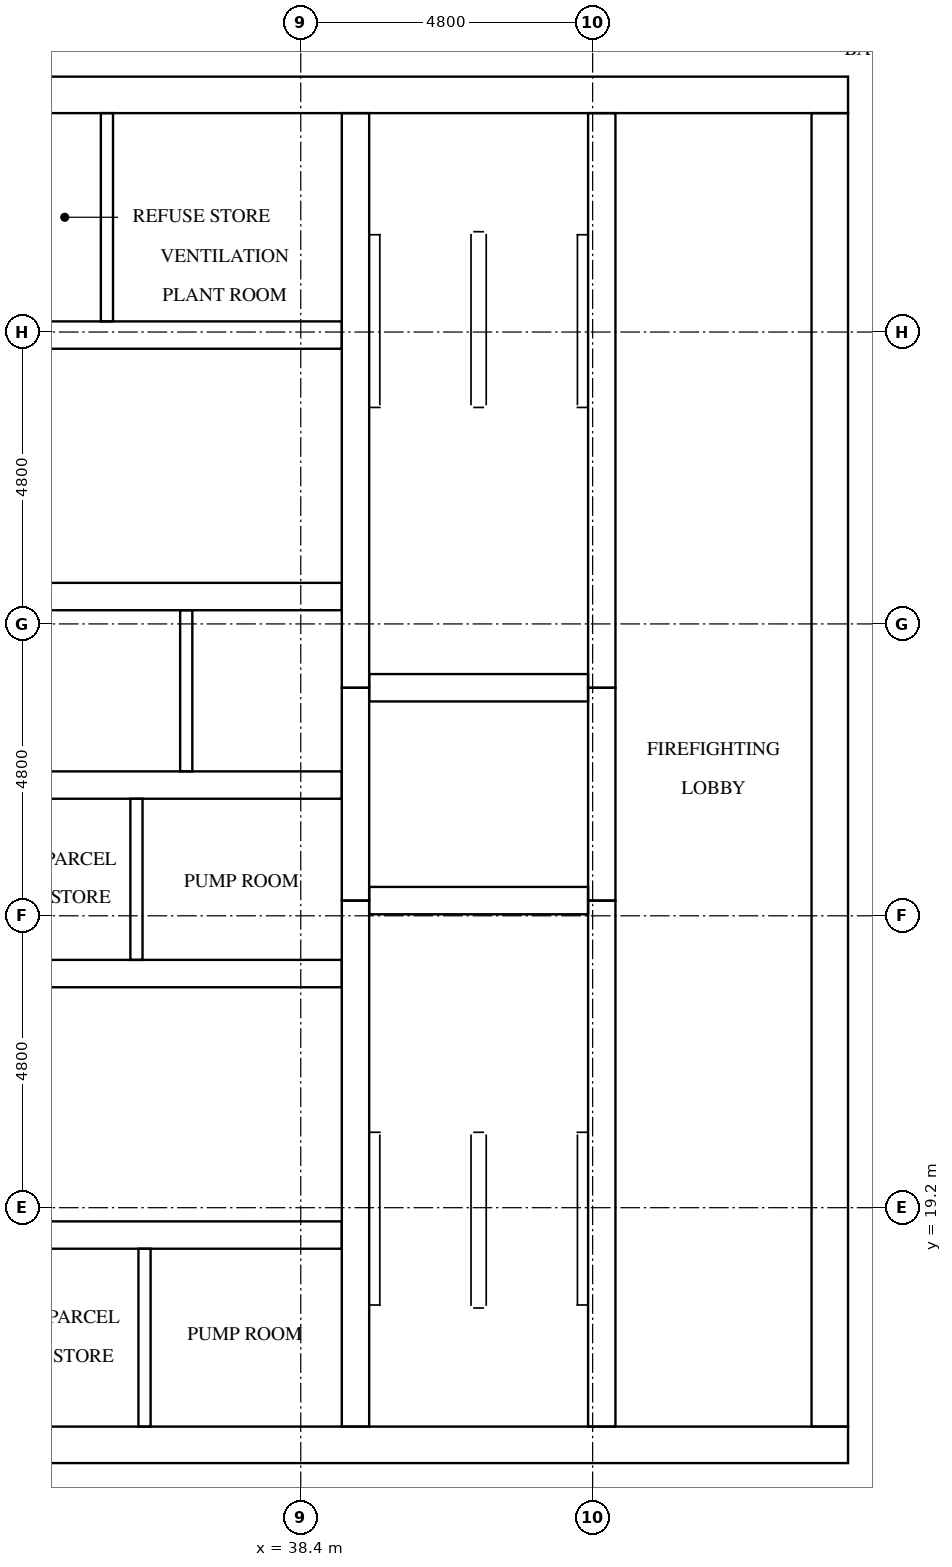
"""IFC4 building model, lengths in metres.
Left out: names, types, materials, properties, quantities, classifications, styles, units other than length and angle.
Written with IfcOpenShell. Run it as: python <this file> out.ifc"""

import sys

from ifc_helpers import new_model, si_unit, direction, frame, frame_2d, origin, place, context, subcontext, project, spatial, rectangle, extrude, element, fill, save


model = new_model("IFC4")
c1 = context("Model", 3, precision=1e-05, world=origin(), true_north=direction((0.0, 1.0)))
c2 = subcontext(c1, "Body", "Model", "MODEL_VIEW")
j1 = project(units=[si_unit("LENGTHUNIT", "METRE"), si_unit("PLANEANGLEUNIT", "RADIAN")], contexts=[c1])
p1 = place(None, origin())
s1 = spatial("IfcSite", under=j1, at=p1, CompositionType="ELEMENT")
p2 = place(p1, origin())
s2 = spatial("IfcBuilding", under=s1, at=p2, CompositionType="ELEMENT")
p3 = place(p2, frame((0.0, 0.0, 245.7)))
s3 = spatial("IfcBuildingStorey", under=s2, at=p3, CompositionType="ELEMENT", Elevation=245.7)
p4 = place(p3, frame((15.0, 15.3, 0.0), z_axis=(0.0, 0.0, 1.0), x_axis=(1.0, 0.0, 0.0)))
e1 = element("IfcWall", 1, at=p4, inside=s3, PredefinedType="SHEAR", context=c2, shape_type="SweptSolid", body=[
    extrude(rectangle(XDim=32.4, YDim=0.6, at=frame_2d((16.2, 0.0))), origin(), (0.0, 0.0, 1.0), 3.2),
])
p5 = place(p4, frame((15.3, 0.0, 0.0)))
e2 = element("IfcOpeningElement", 2, at=p5, cuts=e1, PredefinedType="OPENING", context=c2, shape_type="SweptSolid", body=[
    extrude(rectangle(XDim=1.8, YDim=2.1, at=frame_2d((0.9, 1.05))), frame((0.0, 0.31, 0.0), z_axis=(0.0, -1.0, 0.0), x_axis=(1.0, 0.0, 0.0)), (0.0, 0.0, 1.0), 0.62),
])
p6 = place(p3, frame((15.0, 37.5, 0.0), z_axis=(0.0, 0.0, 1.0), x_axis=(1.0, 0.0, 0.0)))
e3 = element("IfcWall", 3, at=p6, inside=s3, PredefinedType="SHEAR", context=c2, shape_type="SweptSolid", body=[
    extrude(rectangle(XDim=32.4, YDim=0.6, at=frame_2d((16.2, 0.0))), origin(), (0.0, 0.0, 1.0), 3.2),
])
p7 = place(p6, frame((15.3, 0.0, 0.0)))
e4 = element("IfcOpeningElement", 4, at=p7, cuts=e3, PredefinedType="OPENING", context=c2, shape_type="SweptSolid", body=[
    extrude(rectangle(XDim=1.8, YDim=2.1, at=frame_2d((0.9, 1.05))), frame((0.0, 0.31, 0.0), z_axis=(0.0, -1.0, 0.0), x_axis=(1.0, 0.0, 0.0)), (0.0, 0.0, 1.0), 0.62),
])
p8 = place(p6, frame((1.25, 0.0, 0.0)))
e5 = element("IfcOpeningElement", 5, at=p8, cuts=e3, PredefinedType="OPENING", context=c2, shape_type="SweptSolid", body=[
    extrude(rectangle(XDim=1.0, YDim=2.1, at=frame_2d((0.5, 1.05))), frame((0.0, 0.31, 0.0), z_axis=(0.0, -1.0, 0.0), x_axis=(1.0, 0.0, 0.0)), (0.0, 0.0, 1.0), 0.62),
])
p9 = place(p6, frame((4.988, 0.0, 0.0)))
e6 = element("IfcOpeningElement", 6, at=p9, cuts=e3, PredefinedType="OPENING", context=c2, shape_type="SweptSolid", body=[
    extrude(rectangle(XDim=1.0, YDim=2.1, at=frame_2d((0.5, 1.05))), frame((0.0, 0.31, 0.0), z_axis=(0.0, -1.0, 0.0), x_axis=(1.0, 0.0, 0.0)), (0.0, 0.0, 1.0), 0.62),
])
p10 = place(p3, frame((47.1, 15.6, 0.0), z_axis=(0.0, 0.0, 1.0), x_axis=(0.0, 1.0, 0.0)))
e7 = element("IfcWall", 7, at=p10, inside=s3, PredefinedType="SHEAR", context=c2, shape_type="SweptSolid", body=[
    extrude(rectangle(XDim=21.6, YDim=0.6, at=frame_2d((10.8, 0.0))), origin(), (0.0, 0.0, 1.0), 3.2),
])
p11 = place(p10, frame((10.5, 0.0, 0.0)))
e8 = element("IfcOpeningElement", 8, at=p11, cuts=e7, PredefinedType="OPENING", context=c2, shape_type="SweptSolid", body=[
    extrude(rectangle(XDim=1.2, YDim=2.1, at=frame_2d((0.6, 1.05))), frame((0.0, 0.31, 0.0), z_axis=(0.0, -1.0, 0.0), x_axis=(1.0, 0.0, 0.0)), (0.0, 0.0, 1.0), 0.62),
])
p12 = place(p3, frame((39.3, 15.6, 0.0), z_axis=(0.0, 0.0, 1.0), x_axis=(0.0, 1.0, 0.0)))
e9 = element("IfcWall", 9, at=p12, inside=s3, PredefinedType="SHEAR", context=c2, shape_type="SweptSolid", body=[
    extrude(rectangle(XDim=8.65, YDim=0.45, at=frame_2d((4.325, 0.0))), origin(), (0.0, 0.0, 1.0), 3.2),
])
p13 = place(p3, frame((39.3, 24.25, 0.0), z_axis=(0.0, 0.0, 1.0), x_axis=(0.0, 1.0, 0.0)))
e10 = element("IfcWall", 10, at=p13, inside=s3, PredefinedType="SHEAR", context=c2, shape_type="SweptSolid", body=[
    extrude(rectangle(XDim=3.5, YDim=0.45, at=frame_2d((1.75, 0.0))), origin(), (0.0, 0.0, 1.0), 3.2),
])
p14 = place(p3, frame((39.3, 27.75, 0.0), z_axis=(0.0, 0.0, 1.0), x_axis=(0.0, 1.0, 0.0)))
e11 = element("IfcWall", 11, at=p14, inside=s3, PredefinedType="SHEAR", context=c2, shape_type="SweptSolid", body=[
    extrude(rectangle(XDim=9.45, YDim=0.45, at=frame_2d((4.725, 0.0))), origin(), (0.0, 0.0, 1.0), 3.2),
])
p15 = place(p3, frame((43.35, 15.6, 0.0), z_axis=(0.0, 0.0, 1.0), x_axis=(0.0, 1.0, 0.0)))
e12 = element("IfcWall", 12, at=p15, inside=s3, PredefinedType="SHEAR", context=c2, shape_type="SweptSolid", body=[
    extrude(rectangle(XDim=8.65, YDim=0.45, at=frame_2d((4.325, 0.0))), origin(), (0.0, 0.0, 1.0), 3.2),
])
p16 = place(p15, frame((0.6, 0.0, 0.0)))
e13 = element("IfcOpeningElement", 13, at=p16, cuts=e12, PredefinedType="OPENING", context=c2, shape_type="SweptSolid", body=[
    extrude(rectangle(XDim=1.2, YDim=2.1, at=frame_2d((0.6, 1.05))), frame((0.0, 0.235, 0.0), z_axis=(0.0, -1.0, 0.0), x_axis=(1.0, 0.0, 0.0)), (0.0, 0.0, 1.0), 0.47),
])
p17 = place(p3, frame((43.35, 24.25, 0.0), z_axis=(0.0, 0.0, 1.0), x_axis=(0.0, 1.0, 0.0)))
e14 = element("IfcWall", 14, at=p17, inside=s3, PredefinedType="SHEAR", context=c2, shape_type="SweptSolid", body=[
    extrude(rectangle(XDim=3.5, YDim=0.45, at=frame_2d((1.75, 0.0))), origin(), (0.0, 0.0, 1.0), 3.2),
])
p18 = place(p17, frame((1.2, 0.0, 0.0)))
e15 = element("IfcOpeningElement", 15, at=p18, cuts=e14, PredefinedType="OPENING", context=c2, shape_type="SweptSolid", body=[
    extrude(rectangle(XDim=1.1, YDim=2.1, at=frame_2d((0.55, 1.05))), frame((0.0, 0.235, 0.0), z_axis=(0.0, -1.0, 0.0), x_axis=(1.0, 0.0, 0.0)), (0.0, 0.0, 1.0), 0.47),
])
p19 = place(p3, frame((43.35, 27.75, 0.0), z_axis=(0.0, 0.0, 1.0), x_axis=(0.0, 1.0, 0.0)))
e16 = element("IfcWall", 16, at=p19, inside=s3, PredefinedType="SHEAR", context=c2, shape_type="SweptSolid", body=[
    extrude(rectangle(XDim=9.45, YDim=0.45, at=frame_2d((4.725, 0.0))), origin(), (0.0, 0.0, 1.0), 3.2),
])
p20 = place(p19, frame((7.65, 0.0, 0.0)))
e17 = element("IfcOpeningElement", 17, at=p20, cuts=e16, PredefinedType="OPENING", context=c2, shape_type="SweptSolid", body=[
    extrude(rectangle(XDim=1.2, YDim=2.1, at=frame_2d((0.6, 1.05))), frame((0.0, 0.235, 0.0), z_axis=(0.0, -1.0, 0.0), x_axis=(1.0, 0.0, 0.0)), (0.0, 0.0, 1.0), 0.47),
])
for number, where, z_axis, x_axis in (
    (18, (39.525, 24.25, 0.0), (0.0, 0.0, 1.0), (1.0, 0.0, 0.0)),
    (19, (39.525, 27.75, 0.0), (0.0, 0.0, 1.0), (1.0, 0.0, 0.0)),
):
    element("IfcWall", number, at=place(p3, frame(where, z_axis=z_axis, x_axis=x_axis)), inside=s3, PredefinedType="SHEAR", context=c2, shape_type="SweptSolid", body=[
        extrude(rectangle(XDim=3.6, YDim=0.45, at=frame_2d((1.8, 0.0))), origin(), (0.0, 0.0, 1.0), 3.2),
    ])
p21 = place(p3, frame((33.475, 18.75, 0.0), z_axis=(0.0, 0.0, 1.0), x_axis=(1.0, 0.0, 0.0)))
e20 = element("IfcWall", 20, at=p21, inside=s3, PredefinedType="SHEAR", context=c2, shape_type="SweptSolid", body=[
    extrude(rectangle(XDim=5.6, YDim=0.45, at=frame_2d((2.8, 0.0))), origin(), (0.0, 0.0, 1.0), 3.2),
])
p22 = place(p21, frame((0.853, 0.0, 0.0)))
e21 = element("IfcOpeningElement", 21, at=p22, cuts=e20, PredefinedType="OPENING", context=c2, shape_type="SweptSolid", body=[
    extrude(rectangle(XDim=1.0, YDim=2.1, at=frame_2d((0.5, 1.05))), frame((0.0, 0.235, 0.0), z_axis=(0.0, -1.0, 0.0), x_axis=(1.0, 0.0, 0.0)), (0.0, 0.0, 1.0), 0.47),
])
p23 = place(p21, frame((3.528, 0.0, 0.0)))
e22 = element("IfcOpeningElement", 22, at=p23, cuts=e20, PredefinedType="OPENING", context=c2, shape_type="SweptSolid", body=[
    extrude(rectangle(XDim=1.0, YDim=2.1, at=frame_2d((0.5, 1.05))), frame((0.0, 0.235, 0.0), z_axis=(0.0, -1.0, 0.0), x_axis=(1.0, 0.0, 0.0)), (0.0, 0.0, 1.0), 0.47),
])
p24 = place(p3, frame((23.325, 23.05, 0.0), z_axis=(0.0, 0.0, 1.0), x_axis=(1.0, 0.0, 0.0)))
e23 = element("IfcWall", 23, at=p24, inside=s3, PredefinedType="SHEAR", context=c2, shape_type="SweptSolid", body=[
    extrude(rectangle(XDim=15.75, YDim=0.45, at=frame_2d((7.875, 0.0))), origin(), (0.0, 0.0, 1.0), 3.2),
])
p25 = place(p24, frame((0.32, 0.0, 0.0)))
e24 = element("IfcOpeningElement", 24, at=p25, cuts=e23, PredefinedType="OPENING", context=c2, shape_type="SweptSolid", body=[
    extrude(rectangle(XDim=1.0, YDim=2.1, at=frame_2d((0.5, 1.05))), frame((0.0, 0.235, 0.0), z_axis=(0.0, -1.0, 0.0), x_axis=(1.0, 0.0, 0.0)), (0.0, 0.0, 1.0), 0.47),
])
p26 = place(p24, frame((2.978, 0.0, 0.0)))
e25 = element("IfcOpeningElement", 25, at=p26, cuts=e23, PredefinedType="OPENING", context=c2, shape_type="SweptSolid", body=[
    extrude(rectangle(XDim=1.0, YDim=2.1, at=frame_2d((0.5, 1.05))), frame((0.0, 0.235, 0.0), z_axis=(0.0, -1.0, 0.0), x_axis=(1.0, 0.0, 0.0)), (0.0, 0.0, 1.0), 0.47),
])
p27 = place(p24, frame((10.953, 0.0, 0.0)))
e26 = element("IfcOpeningElement", 26, at=p27, cuts=e23, PredefinedType="OPENING", context=c2, shape_type="SweptSolid", body=[
    extrude(rectangle(XDim=1.0, YDim=2.1, at=frame_2d((0.5, 1.05))), frame((0.0, 0.235, 0.0), z_axis=(0.0, -1.0, 0.0), x_axis=(1.0, 0.0, 0.0)), (0.0, 0.0, 1.0), 0.47),
])
p28 = place(p24, frame((13.612, 0.0, 0.0)))
e27 = element("IfcOpeningElement", 27, at=p28, cuts=e23, PredefinedType="OPENING", context=c2, shape_type="SweptSolid", body=[
    extrude(rectangle(XDim=1.0, YDim=2.1, at=frame_2d((0.5, 1.05))), frame((0.0, 0.235, 0.0), z_axis=(0.0, -1.0, 0.0), x_axis=(1.0, 0.0, 0.0)), (0.0, 0.0, 1.0), 0.47),
])
p29 = place(p3, frame((23.325, 26.15, 0.0), z_axis=(0.0, 0.0, 1.0), x_axis=(1.0, 0.0, 0.0)))
e28 = element("IfcWall", 28, at=p29, inside=s3, PredefinedType="SHEAR", context=c2, shape_type="SweptSolid", body=[
    extrude(rectangle(XDim=15.75, YDim=0.45, at=frame_2d((7.875, 0.0))), origin(), (0.0, 0.0, 1.0), 3.2),
])
p30 = place(p3, frame((23.325, 29.25, 0.0), z_axis=(0.0, 0.0, 1.0), x_axis=(1.0, 0.0, 0.0)))
e29 = element("IfcWall", 29, at=p30, inside=s3, PredefinedType="SHEAR", context=c2, shape_type="SweptSolid", body=[
    extrude(rectangle(XDim=15.75, YDim=0.45, at=frame_2d((7.875, 0.0))), origin(), (0.0, 0.0, 1.0), 3.2),
])
p31 = place(p30, frame((0.679, 0.0, 0.0)))
e30 = element("IfcOpeningElement", 30, at=p31, cuts=e29, PredefinedType="OPENING", context=c2, shape_type="SweptSolid", body=[
    extrude(rectangle(XDim=1.1, YDim=2.1, at=frame_2d((0.55, 1.05))), frame((0.0, 0.235, 0.0), z_axis=(0.0, -1.0, 0.0), x_axis=(1.0, 0.0, 0.0)), (0.0, 0.0, 1.0), 0.47),
])
p32 = place(p30, frame((3.337, 0.0, 0.0)))
e31 = element("IfcOpeningElement", 31, at=p32, cuts=e29, PredefinedType="OPENING", context=c2, shape_type="SweptSolid", body=[
    extrude(rectangle(XDim=1.1, YDim=2.1, at=frame_2d((0.55, 1.05))), frame((0.0, 0.235, 0.0), z_axis=(0.0, -1.0, 0.0), x_axis=(1.0, 0.0, 0.0)), (0.0, 0.0, 1.0), 0.47),
])
p33 = place(p30, frame((5.996, 0.0, 0.0)))
e32 = element("IfcOpeningElement", 32, at=p33, cuts=e29, PredefinedType="OPENING", context=c2, shape_type="SweptSolid", body=[
    extrude(rectangle(XDim=1.1, YDim=2.1, at=frame_2d((0.55, 1.05))), frame((0.0, 0.235, 0.0), z_axis=(0.0, -1.0, 0.0), x_axis=(1.0, 0.0, 0.0)), (0.0, 0.0, 1.0), 0.47),
])
p34 = place(p30, frame((8.654, 0.0, 0.0)))
e33 = element("IfcOpeningElement", 33, at=p34, cuts=e29, PredefinedType="OPENING", context=c2, shape_type="SweptSolid", body=[
    extrude(rectangle(XDim=1.1, YDim=2.1, at=frame_2d((0.55, 1.05))), frame((0.0, 0.235, 0.0), z_axis=(0.0, -1.0, 0.0), x_axis=(1.0, 0.0, 0.0)), (0.0, 0.0, 1.0), 0.47),
])
p35 = place(p30, frame((11.312, 0.0, 0.0)))
e34 = element("IfcOpeningElement", 34, at=p35, cuts=e29, PredefinedType="OPENING", context=c2, shape_type="SweptSolid", body=[
    extrude(rectangle(XDim=1.1, YDim=2.1, at=frame_2d((0.55, 1.05))), frame((0.0, 0.235, 0.0), z_axis=(0.0, -1.0, 0.0), x_axis=(1.0, 0.0, 0.0)), (0.0, 0.0, 1.0), 0.47),
])
p36 = place(p30, frame((13.971, 0.0, 0.0)))
e35 = element("IfcOpeningElement", 35, at=p36, cuts=e29, PredefinedType="OPENING", context=c2, shape_type="SweptSolid", body=[
    extrude(rectangle(XDim=1.1, YDim=2.1, at=frame_2d((0.55, 1.05))), frame((0.0, 0.235, 0.0), z_axis=(0.0, -1.0, 0.0), x_axis=(1.0, 0.0, 0.0)), (0.0, 0.0, 1.0), 0.47),
])
p37 = place(p3, frame((33.475, 33.55, 0.0), z_axis=(0.0, 0.0, 1.0), x_axis=(1.0, 0.0, 0.0)))
e36 = element("IfcWall", 36, at=p37, inside=s3, PredefinedType="SHEAR", context=c2, shape_type="SweptSolid", body=[
    extrude(rectangle(XDim=5.6, YDim=0.45, at=frame_2d((2.8, 0.0))), origin(), (0.0, 0.0, 1.0), 3.2),
])
p38 = place(p37, frame((0.544, 0.0, 0.0)))
e37 = element("IfcOpeningElement", 37, at=p38, cuts=e36, PredefinedType="OPENING", context=c2, shape_type="SweptSolid", body=[
    extrude(rectangle(XDim=1.0, YDim=2.1, at=frame_2d((0.5, 1.05))), frame((0.0, 0.235, 0.0), z_axis=(0.0, -1.0, 0.0), x_axis=(1.0, 0.0, 0.0)), (0.0, 0.0, 1.0), 0.47),
])
p39 = place(p37, frame((3.219, 0.0, 0.0)))
e38 = element("IfcOpeningElement", 38, at=p39, cuts=e36, PredefinedType="OPENING", context=c2, shape_type="SweptSolid", body=[
    extrude(rectangle(XDim=1.0, YDim=2.1, at=frame_2d((0.5, 1.05))), frame((0.0, 0.235, 0.0), z_axis=(0.0, -1.0, 0.0), x_axis=(1.0, 0.0, 0.0)), (0.0, 0.0, 1.0), 0.47),
])
p40 = place(p3, frame((36.517, 26.375, 0.0), z_axis=(0.0, 0.0, 1.0), x_axis=(0.0, 1.0, 0.0)))
e39 = element("IfcWall", 39, at=p40, inside=s3, PredefinedType="SOLIDWALL", context=c2, shape_type="SweptSolid", body=[
    extrude(rectangle(XDim=2.65, YDim=0.2, at=frame_2d((1.325, 0.0))), origin(), (0.0, 0.0, 1.0), 3.2),
])
p41 = place(p3, frame((35.698, 23.275, 0.0), z_axis=(0.0, 0.0, 1.0), x_axis=(0.0, 1.0, 0.0)))
e40 = element("IfcWall", 40, at=p41, inside=s3, PredefinedType="PARTITIONING", context=c2, shape_type="SweptSolid", body=[
    extrude(rectangle(XDim=2.65, YDim=0.2, at=frame_2d((1.325, 0.0))), origin(), (0.0, 0.0, 1.0), 3.2),
])
p42 = place(p3, frame((35.831, 15.6, 0.0), z_axis=(0.0, 0.0, 1.0), x_axis=(0.0, 1.0, 0.0)))
e41 = element("IfcWall", 41, at=p42, inside=s3, PredefinedType="PARTITIONING", context=c2, shape_type="SweptSolid", body=[
    extrude(rectangle(XDim=2.925, YDim=0.2, at=frame_2d((1.462, 0.0))), origin(), (0.0, 0.0, 1.0), 3.2),
])
p43 = place(p3, frame((35.212, 33.775, 0.0), z_axis=(0.0, 0.0, 1.0), x_axis=(0.0, 1.0, 0.0)))
e42 = element("IfcWall", 42, at=p43, inside=s3, PredefinedType="PARTITIONING", context=c2, shape_type="SweptSolid", body=[
    extrude(rectangle(XDim=3.425, YDim=0.2, at=frame_2d((1.712, 0.0))), origin(), (0.0, 0.0, 1.0), 3.2),
])
p44 = place(p35, origin())
e43 = element("IfcDoor", 43, at=p44, inside=s3, OperationType="DOUBLE_DOOR_SLIDING", PredefinedType="DOOR", context=c2, shape_type="SweptSolid", body=[
    extrude(rectangle(XDim=1.1, YDim=2.1, at=frame_2d((0.55, 1.05))), frame((0.0, 0.025, 0.0), z_axis=(0.0, -1.0, 0.0), x_axis=(1.0, 0.0, 0.0)), (0.0, 0.0, 1.0), 0.05),
])
fill(e34, e43)
p45 = place(p36, origin())
e44 = element("IfcDoor", 44, at=p45, inside=s3, OperationType="DOUBLE_DOOR_SLIDING", PredefinedType="DOOR", context=c2, shape_type="SweptSolid", body=[
    extrude(rectangle(XDim=1.1, YDim=2.1, at=frame_2d((0.55, 1.05))), frame((0.0, 0.025, 0.0), z_axis=(0.0, -1.0, 0.0), x_axis=(1.0, 0.0, 0.0)), (0.0, 0.0, 1.0), 0.05),
])
fill(e35, e44)
p46 = place(p18, origin())
e45 = element("IfcDoor", 45, at=p46, inside=s3, OperationType="DOUBLE_DOOR_SLIDING", PredefinedType="DOOR", context=c2, shape_type="SweptSolid", body=[
    extrude(rectangle(XDim=1.1, YDim=2.1, at=frame_2d((0.55, 1.05))), frame((0.0, 0.025, 0.0), z_axis=(0.0, -1.0, 0.0), x_axis=(1.0, 0.0, 0.0)), (0.0, 0.0, 1.0), 0.05),
])
fill(e15, e45)
p47 = place(p16, origin())
e46 = element("IfcDoor", 46, at=p47, inside=s3, OperationType="SINGLE_SWING_LEFT", PredefinedType="DOOR", context=c2, shape_type="SweptSolid", body=[
    extrude(rectangle(XDim=1.2, YDim=2.1, at=frame_2d((0.6, 1.05))), frame((0.0, 0.025, 0.0), z_axis=(0.0, -1.0, 0.0), x_axis=(1.0, 0.0, 0.0)), (0.0, 0.0, 1.0), 0.05),
])
fill(e13, e46)
p48 = place(p20, origin())
e47 = element("IfcDoor", 47, at=p48, inside=s3, OperationType="SINGLE_SWING_RIGHT", PredefinedType="DOOR", context=c2, shape_type="SweptSolid", body=[
    extrude(rectangle(XDim=1.2, YDim=2.1, at=frame_2d((0.6, 1.05))), frame((0.0, 0.025, 0.0), z_axis=(0.0, -1.0, 0.0), x_axis=(1.0, 0.0, 0.0)), (0.0, 0.0, 1.0), 0.05),
])
fill(e17, e47)
p49 = place(p11, origin())
e48 = element("IfcDoor", 48, at=p49, inside=s3, OperationType="SINGLE_SWING_RIGHT", PredefinedType="DOOR", context=c2, shape_type="SweptSolid", body=[
    extrude(rectangle(XDim=1.2, YDim=2.1, at=frame_2d((0.6, 1.05))), frame((0.0, 0.025, 0.0), z_axis=(0.0, -1.0, 0.0), x_axis=(1.0, 0.0, 0.0)), (0.0, 0.0, 1.0), 0.05),
])
fill(e8, e48)
p50 = place(p27, frame((1.0, 0.0, 0.0), z_axis=(0.0, 0.0, 1.0), x_axis=(-1.0, 0.0, 0.0)))
e49 = element("IfcDoor", 49, at=p50, inside=s3, OperationType="SINGLE_SWING_LEFT", PredefinedType="DOOR", context=c2, shape_type="SweptSolid", body=[
    extrude(rectangle(XDim=1.0, YDim=2.1, at=frame_2d((0.5, 1.05))), frame((0.0, 0.025, 0.0), z_axis=(0.0, -1.0, 0.0), x_axis=(1.0, 0.0, 0.0)), (0.0, 0.0, 1.0), 0.05),
])
fill(e26, e49)
p51 = place(p28, frame((1.0, 0.0, 0.0), z_axis=(0.0, 0.0, 1.0), x_axis=(-1.0, 0.0, 0.0)))
e50 = element("IfcDoor", 50, at=p51, inside=s3, OperationType="SINGLE_SWING_RIGHT", PredefinedType="DOOR", context=c2, shape_type="SweptSolid", body=[
    extrude(rectangle(XDim=1.0, YDim=2.1, at=frame_2d((0.5, 1.05))), frame((0.0, 0.025, 0.0), z_axis=(0.0, -1.0, 0.0), x_axis=(1.0, 0.0, 0.0)), (0.0, 0.0, 1.0), 0.05),
])
fill(e27, e50)
p52 = place(p22, origin())
e51 = element("IfcDoor", 51, at=p52, inside=s3, OperationType="SINGLE_SWING_LEFT", PredefinedType="DOOR", context=c2, shape_type="SweptSolid", body=[
    extrude(rectangle(XDim=1.0, YDim=2.1, at=frame_2d((0.5, 1.05))), frame((0.0, 0.025, 0.0), z_axis=(0.0, -1.0, 0.0), x_axis=(1.0, 0.0, 0.0)), (0.0, 0.0, 1.0), 0.05),
])
fill(e21, e51)
p53 = place(p23, origin())
e52 = element("IfcDoor", 52, at=p53, inside=s3, OperationType="SINGLE_SWING_RIGHT", PredefinedType="DOOR", context=c2, shape_type="SweptSolid", body=[
    extrude(rectangle(XDim=1.0, YDim=2.1, at=frame_2d((0.5, 1.05))), frame((0.0, 0.025, 0.0), z_axis=(0.0, -1.0, 0.0), x_axis=(1.0, 0.0, 0.0)), (0.0, 0.0, 1.0), 0.05),
])
fill(e22, e52)
p54 = place(p38, frame((1.0, 0.0, 0.0), z_axis=(0.0, 0.0, 1.0), x_axis=(-1.0, 0.0, 0.0)))
e53 = element("IfcDoor", 53, at=p54, inside=s3, OperationType="SINGLE_SWING_LEFT", PredefinedType="DOOR", context=c2, shape_type="SweptSolid", body=[
    extrude(rectangle(XDim=1.0, YDim=2.1, at=frame_2d((0.5, 1.05))), frame((0.0, 0.025, 0.0), z_axis=(0.0, -1.0, 0.0), x_axis=(1.0, 0.0, 0.0)), (0.0, 0.0, 1.0), 0.05),
])
fill(e37, e53)
p55 = place(p39, frame((1.0, 0.0, 0.0), z_axis=(0.0, 0.0, 1.0), x_axis=(-1.0, 0.0, 0.0)))
e54 = element("IfcDoor", 54, at=p55, inside=s3, OperationType="SINGLE_SWING_RIGHT", PredefinedType="DOOR", context=c2, shape_type="SweptSolid", body=[
    extrude(rectangle(XDim=1.0, YDim=2.1, at=frame_2d((0.5, 1.05))), frame((0.0, 0.025, 0.0), z_axis=(0.0, -1.0, 0.0), x_axis=(1.0, 0.0, 0.0)), (0.0, 0.0, 1.0), 0.05),
])
fill(e38, e54)
save(model, sys.argv[1])
